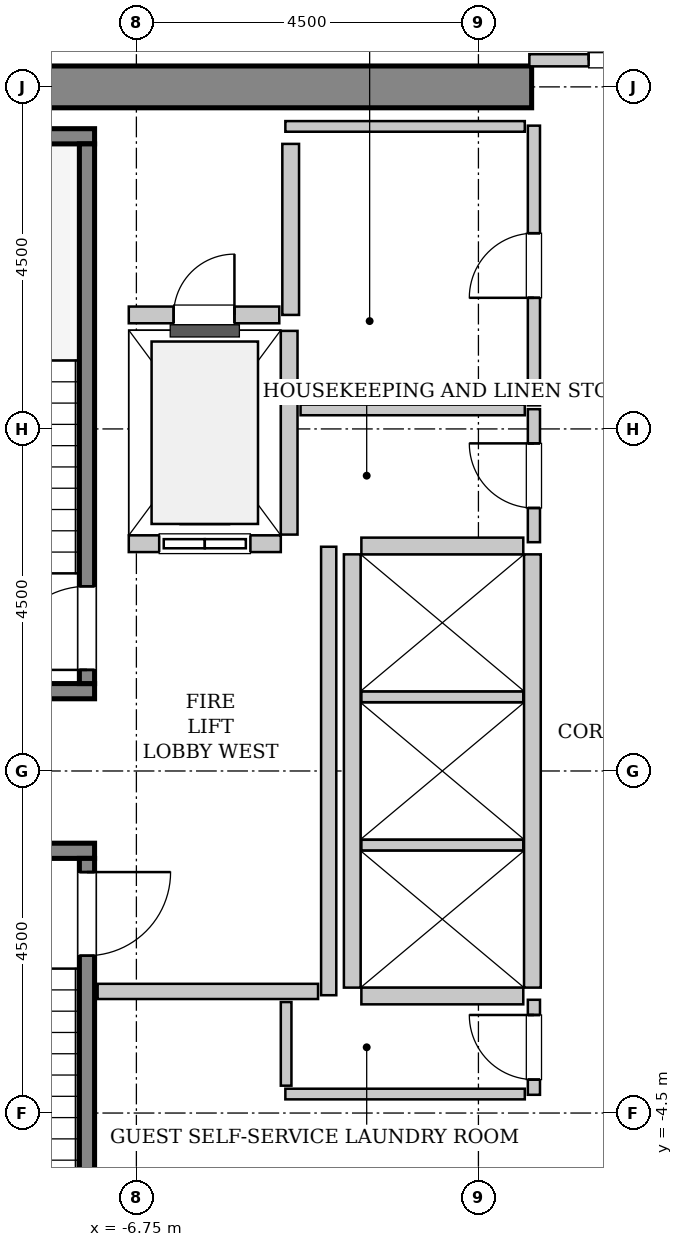
"""IFC4 building model, lengths in metres.
Left out: names, types, materials, properties, quantities, classifications, styles, units other than length and angle.
Written with IfcOpenShell. Run it as: python <this file> out.ifc"""

import sys

from ifc_helpers import new_model, si_unit, direction, frame, frame_2d, origin, place, context, subcontext, project, spatial, rectangle, extrude, source, transform, mapped, element, fill, save


model = new_model("IFC4")
c1 = context("Model", 3, precision=1e-05, world=origin(), true_north=direction((0.0, 1.0)))
c2 = subcontext(c1, "Body", "Model", "MODEL_VIEW")
j1 = project(units=[si_unit("LENGTHUNIT", "METRE"), si_unit("PLANEANGLEUNIT", "RADIAN")], contexts=[c1])
p1 = place(None, origin())
s1 = spatial("IfcSite", under=j1, at=p1, CompositionType="ELEMENT")
p2 = place(p1, origin())
s2 = spatial("IfcBuilding", under=s1, at=p2, CompositionType="ELEMENT")
p3 = place(p2, frame((0.0, 0.0, 152.6)))
s3 = spatial("IfcBuildingStorey", under=s2, at=p3, CompositionType="ELEMENT", Elevation=152.6)
m1 = source(origin(), c2, "Body", "SweptSolid", [
    extrude(rectangle(XDim=9.975, YDim=0.55, at=frame_2d((4.987, 0.0))), origin(), (0.0, 0.0, 1.0), 3.8),
])
p4 = place(p3, frame((-11.525, 9.0, 0.0), z_axis=(0.0, 0.0, 1.0), x_axis=(1.0, 0.0, 0.0)))
e1 = element("IfcWall", 1, at=p4, inside=s3, PredefinedType="SHEAR", context=c2, shape_type="MappedRepresentation", body=[
    mapped(m1, transform((0.0, 0.0, 0.0), x_axis=(1.0, 0.0, 0.0), y_axis=(0.0, 1.0, 0.0), z_axis=(0.0, 0.0, 1.0), scale=1.0)),
])
m2 = source(origin(), c2, "Body", "SweptSolid", [
    extrude(rectangle(XDim=3.4, YDim=0.2, at=frame_2d((1.7, 0.0))), origin(), (0.0, 0.0, 1.0), 3.8),
])
p5 = place(p3, frame((-7.3, 1.05, 0.0), z_axis=(0.0, 0.0, 1.0), x_axis=(-1.0, 0.0, 0.0)))
e2 = element("IfcWall", 2, at=p5, inside=s3, PredefinedType="SOLIDWALL", context=c2, shape_type="MappedRepresentation", body=[
    mapped(m2, transform((0.0, 0.0, 0.0), x_axis=(1.0, 0.0, 0.0), y_axis=(0.0, 1.0, 0.0), z_axis=(0.0, 0.0, 1.0), scale=1.0)),
])
m3 = source(origin(), c2, "Body", "SweptSolid", [
    extrude(rectangle(XDim=3.68, YDim=0.2, at=frame_2d((1.84, 0.0))), origin(), (0.0, 0.0, 1.0), 3.8),
])
p6 = place(p3, frame((-7.3, 8.35, 0.0), z_axis=(0.0, 0.0, 1.0), x_axis=(-1.0, 0.0, 0.0)))
e3 = element("IfcWall", 3, at=p6, inside=s3, PredefinedType="SOLIDWALL", context=c2, shape_type="MappedRepresentation", body=[
    mapped(m3, transform((0.0, 0.0, 0.0), x_axis=(1.0, 0.0, 0.0), y_axis=(0.0, 1.0, 0.0), z_axis=(0.0, 0.0, 1.0), scale=1.0)),
])
m4 = source(origin(), c2, "Body", "SweptSolid", [
    extrude(rectangle(XDim=7.1, YDim=0.2, at=frame_2d((3.55, 0.0))), origin(), (0.0, 0.0, 1.0), 3.8),
])
p7 = place(p3, frame((-7.4, 1.15, 0.0), z_axis=(0.0, 0.0, 1.0), x_axis=(0.0, 1.0, 0.0)))
e4 = element("IfcWall", 4, at=p7, inside=s3, PredefinedType="SOLIDWALL", context=c2, shape_type="MappedRepresentation", body=[
    mapped(m4, transform((0.0, 0.0, 0.0), x_axis=(1.0, 0.0, 0.0), y_axis=(0.0, 1.0, 0.0), z_axis=(0.0, 0.0, 1.0), scale=1.0)),
])
p8 = place(p7, frame((0.18, 0.0, 0.0)))
e5 = element("IfcOpeningElement", 5, at=p8, cuts=e4, PredefinedType="OPENING", context=c2, shape_type="SweptSolid", body=[
    extrude(rectangle(XDim=1.1, YDim=2.15, at=frame_2d((0.55, 1.075))), frame((0.0, 0.11, 0.0), z_axis=(0.0, -1.0, 0.0), x_axis=(1.0, 0.0, 0.0)), (0.0, 0.0, 1.0), 0.22),
])
p9 = place(p3, frame((-10.7, -1.05, 0.0), z_axis=(0.0, 0.0, 1.0), x_axis=(1.0, 0.0, 0.0)))
e6 = element("IfcWall", 6, at=p9, inside=s3, PredefinedType="SOLIDWALL", context=c2, shape_type="MappedRepresentation", body=[
    mapped(m2, transform((0.0, 0.0, 0.0), x_axis=(1.0, 0.0, 0.0), y_axis=(0.0, 1.0, 0.0), z_axis=(0.0, 0.0, 1.0), scale=1.0)),
])
p10 = place(p3, frame((-7.4, -1.15, 0.0), z_axis=(0.0, 0.0, 1.0), x_axis=(0.0, -1.0, 0.0)))
e7 = element("IfcWall", 7, at=p10, inside=s3, PredefinedType="SOLIDWALL", context=c2, shape_type="MappedRepresentation", body=[
    mapped(m4, transform((0.0, 0.0, 0.0), x_axis=(1.0, 0.0, 0.0), y_axis=(0.0, 1.0, 0.0), z_axis=(0.0, 0.0, 1.0), scale=1.0)),
])
p11 = place(p10, frame((0.18, 0.0, 0.0)))
e8 = element("IfcOpeningElement", 8, at=p11, cuts=e7, PredefinedType="OPENING", context=c2, shape_type="SweptSolid", body=[
    extrude(rectangle(XDim=1.1, YDim=2.15, at=frame_2d((0.55, 1.075))), frame((0.0, 0.11, 0.0), z_axis=(0.0, -1.0, 0.0), x_axis=(1.0, 0.0, 0.0)), (0.0, 0.0, 1.0), 0.22),
])
m5 = source(origin(), c2, "Body", "SweptSolid", [
    extrude(rectangle(XDim=2.0, YDim=0.22, at=frame_2d((1.0, 0.0))), origin(), (0.0, 0.0, 1.0), 3.535),
])
p12 = place(p3, frame((-6.85, 2.99, 0.0), z_axis=(0.0, 0.0, 1.0), x_axis=(1.0, 0.0, 0.0)))
e9 = element("IfcWall", 9, at=p12, inside=s3, PredefinedType="SOLIDWALL", context=c2, shape_type="MappedRepresentation", body=[
    mapped(m5, transform((0.0, 0.0, 0.0), x_axis=(1.0, 0.0, 0.0), y_axis=(0.0, 1.0, 0.0), z_axis=(0.0, 0.0, 1.0), scale=1.0)),
])
p13 = place(p12, frame((0.4, 0.0, 0.0)))
e10 = element("IfcOpeningElement", 10, at=p13, cuts=e9, PredefinedType="OPENING", context=c2, shape_type="SweptSolid", body=[
    extrude(rectangle(XDim=1.2, YDim=2.2, at=frame_2d((0.6, 1.1))), frame((0.0, 0.12, 0.0), z_axis=(0.0, -1.0, 0.0), x_axis=(1.0, 0.0, 0.0)), (0.0, 0.0, 1.0), 0.24),
])
m6 = source(origin(), c2, "Body", "SweptSolid", [
    extrude(rectangle(XDim=2.68, YDim=0.22, at=frame_2d((1.34, 0.0))), origin(), (0.0, 0.0, 1.0), 3.535),
])
p14 = place(p3, frame((-4.74, 3.11, 0.0), z_axis=(0.0, 0.0, 1.0), x_axis=(0.0, 1.0, 0.0)))
e11 = element("IfcWall", 11, at=p14, inside=s3, PredefinedType="SOLIDWALL", context=c2, shape_type="MappedRepresentation", body=[
    mapped(m6, transform((0.0, 0.0, 0.0), x_axis=(1.0, 0.0, 0.0), y_axis=(0.0, 1.0, 0.0), z_axis=(0.0, 0.0, 1.0), scale=1.0)),
])
m7 = source(origin(), c2, "Body", "SweptSolid", [
    extrude(rectangle(XDim=5.7, YDim=0.22, at=frame_2d((2.85, 0.0))), origin(), (0.0, 0.0, 1.0), 3.535),
])
for number, where, z_axis, x_axis in (
    (12, (-1.54, -2.85, 0.0), (0.0, 0.0, 1.0), (0.0, 1.0, 0.0)),
    (13, (-3.91, 2.85, 0.0), (0.0, 0.0, 1.0), (0.0, -1.0, 0.0)),
):
    element("IfcWall", number, at=place(p3, frame(where, z_axis=z_axis, x_axis=x_axis)), inside=s3, PredefinedType="SOLIDWALL", context=c2, shape_type="MappedRepresentation", body=[
        mapped(m7, transform((0.0, 0.0, 0.0), x_axis=(1.0, 0.0, 0.0), y_axis=(0.0, 1.0, 0.0), z_axis=(0.0, 0.0, 1.0), scale=1.0)),
    ])
m8 = source(origin(), c2, "Body", "SweptSolid", [
    extrude(rectangle(XDim=2.13, YDim=0.22, at=frame_2d((1.065, 0.0))), origin(), (0.0, 0.0, 1.0), 3.535),
])
p15 = place(p3, frame((-3.79, -2.96, 0.0), z_axis=(0.0, 0.0, 1.0), x_axis=(1.0, 0.0, 0.0)))
e14 = element("IfcWall", 14, at=p15, inside=s3, PredefinedType="SOLIDWALL", context=c2, shape_type="MappedRepresentation", body=[
    mapped(m8, transform((0.0, 0.0, 0.0), x_axis=(1.0, 0.0, 0.0), y_axis=(0.0, 1.0, 0.0), z_axis=(0.0, 0.0, 1.0), scale=1.0)),
])
m9 = source(origin(), c2, "Body", "SweptSolid", [
    extrude(rectangle(XDim=2.13, YDim=0.14, at=frame_2d((1.065, 0.0))), origin(), (0.0, 0.0, 1.0), 3.535),
])
for number, where, z_axis, x_axis in (
    (15, (-3.79, -0.975, 0.0), (0.0, 0.0, 1.0), (1.0, 0.0, 0.0)),
    (16, (-3.79, 0.975, 0.0), (0.0, 0.0, 1.0), (1.0, 0.0, 0.0)),
):
    element("IfcWall", number, at=place(p3, frame(where, z_axis=z_axis, x_axis=x_axis)), inside=s3, PredefinedType="PARTITIONING", context=c2, shape_type="MappedRepresentation", body=[
        mapped(m9, transform((0.0, 0.0, 0.0), x_axis=(1.0, 0.0, 0.0), y_axis=(0.0, 1.0, 0.0), z_axis=(0.0, 0.0, 1.0), scale=1.0)),
    ])
p16 = place(p3, frame((-1.66, 2.96, 0.0), z_axis=(0.0, 0.0, 1.0), x_axis=(-1.0, 0.0, 0.0)))
e17 = element("IfcWall", 17, at=p16, inside=s3, PredefinedType="SOLIDWALL", context=c2, shape_type="MappedRepresentation", body=[
    mapped(m8, transform((0.0, 0.0, 0.0), x_axis=(1.0, 0.0, 0.0), y_axis=(0.0, 1.0, 0.0), z_axis=(0.0, 0.0, 1.0), scale=1.0)),
])
m10 = source(origin(), c2, "Body", "SweptSolid", [
    extrude(rectangle(XDim=2.25, YDim=0.22, at=frame_2d((1.125, 0.0))), origin(), (0.0, 0.0, 1.0), 3.535),
])
p17 = place(p3, frame((-4.72, 6.0, 0.0), z_axis=(0.0, 0.0, 1.0), x_axis=(0.0, 1.0, 0.0)))
e18 = element("IfcWall", 18, at=p17, inside=s3, PredefinedType="SOLIDWALL", context=c2, shape_type="MappedRepresentation", body=[
    mapped(m10, transform((0.0, 0.0, 0.0), x_axis=(1.0, 0.0, 0.0), y_axis=(0.0, 1.0, 0.0), z_axis=(0.0, 0.0, 1.0), scale=1.0)),
])
m11 = source(origin(), c2, "Body", "SweptSolid", [
    extrude(rectangle(XDim=1.98, YDim=0.22, at=frame_2d((0.99, 0.0))), origin(), (0.0, 0.0, 1.0), 3.535),
])
p18 = place(p3, frame((-6.85, 6.0, 0.0), z_axis=(0.0, 0.0, 1.0), x_axis=(1.0, 0.0, 0.0)))
e19 = element("IfcWall", 19, at=p18, inside=s3, PredefinedType="SOLIDWALL", context=c2, shape_type="MappedRepresentation", body=[
    mapped(m11, transform((0.0, 0.0, 0.0), x_axis=(1.0, 0.0, 0.0), y_axis=(0.0, 1.0, 0.0), z_axis=(0.0, 0.0, 1.0), scale=1.0)),
])
p19 = place(p18, frame((0.59, 0.0, 0.0)))
e20 = element("IfcOpeningElement", 20, at=p19, cuts=e19, PredefinedType="OPENING", context=c2, shape_type="SweptSolid", body=[
    extrude(rectangle(XDim=0.8, YDim=2.0, at=frame_2d((0.4, 1.0))), frame((0.0, 0.12, 0.0), z_axis=(0.0, -1.0, 0.0), x_axis=(1.0, 0.0, 0.0)), (0.0, 0.0, 1.0), 0.24),
])
m12 = source(origin(), c2, "Body", "SweptSolid", [
    extrude(rectangle(XDim=5.9, YDim=0.2, at=frame_2d((2.95, 0.0))), origin(), (0.0, 0.0, 1.0), 3.535),
])
p20 = place(p3, frame((-4.22, -2.95, 0.0), z_axis=(0.0, 0.0, 1.0), x_axis=(0.0, 1.0, 0.0)))
e21 = element("IfcWall", 21, at=p20, inside=s3, PredefinedType="PARTITIONING", context=c2, shape_type="MappedRepresentation", body=[
    mapped(m12, transform((0.0, 0.0, 0.0), x_axis=(1.0, 0.0, 0.0), y_axis=(0.0, 1.0, 0.0), z_axis=(0.0, 0.0, 1.0), scale=1.0)),
])
m13 = source(origin(), c2, "Body", "SweptSolid", [
    extrude(rectangle(XDim=2.9, YDim=0.2, at=frame_2d((1.45, 0.0))), origin(), (0.0, 0.0, 1.0), 3.535),
])
p21 = place(p3, frame((-7.26, -2.9, 0.0), z_axis=(0.0, 0.0, 1.0), x_axis=(1.0, 0.0, 0.0)))
e22 = element("IfcWall", 22, at=p21, inside=s3, PredefinedType="PARTITIONING", context=c2, shape_type="MappedRepresentation", body=[
    mapped(m13, transform((0.0, 0.0, 0.0), x_axis=(1.0, 0.0, 0.0), y_axis=(0.0, 1.0, 0.0), z_axis=(0.0, 0.0, 1.0), scale=1.0)),
])
m14 = source(origin(), c2, "Body", "SweptSolid", [
    extrude(rectangle(XDim=3.16, YDim=0.16, at=frame_2d((1.58, 0.0))), origin(), (0.0, 0.0, 1.0), 2.425),
])
p22 = place(p3, frame((-1.58, 9.35, 0.0), z_axis=(0.0, 0.0, 1.0), x_axis=(1.0, 0.0, 0.0)))
e23 = element("IfcWall", 23, at=p22, inside=s3, PredefinedType="PARTITIONING", context=c2, shape_type="MappedRepresentation", body=[
    mapped(m14, transform((0.0, 0.0, 0.0), x_axis=(1.0, 0.0, 0.0), y_axis=(0.0, 1.0, 0.0), z_axis=(0.0, 0.0, 1.0), scale=1.0)),
])
p23 = place(p22, frame((0.78, 0.0, 0.0)))
e24 = element("IfcOpeningElement", 24, at=p23, cuts=e23, PredefinedType="OPENING", context=c2, shape_type="SweptSolid", body=[
    extrude(rectangle(XDim=1.6, YDim=2.3, at=frame_2d((0.8, 1.15))), frame((0.0, 0.09, 0.0), z_axis=(0.0, -1.0, 0.0), x_axis=(1.0, 0.0, 0.0)), (0.0, 0.0, 1.0), 0.18),
])
m15 = source(origin(), c2, "Body", "SweptSolid", [
    extrude(rectangle(XDim=1.75, YDim=0.16, at=frame_2d((0.875, 0.0))), origin(), (0.0, 0.0, 1.0), 3.535),
])
p24 = place(p3, frame((-1.52, 3.01, 0.0), z_axis=(0.0, 0.0, 1.0), x_axis=(0.0, 1.0, 0.0)))
e25 = element("IfcWall", 25, at=p24, inside=s3, PredefinedType="PARTITIONING", context=c2, shape_type="MappedRepresentation", body=[
    mapped(m15, transform((0.0, 0.0, 0.0), x_axis=(1.0, 0.0, 0.0), y_axis=(0.0, 1.0, 0.0), z_axis=(0.0, 0.0, 1.0), scale=1.0)),
])
p25 = place(p24, frame((0.45, 0.0, 0.0)))
e26 = element("IfcOpeningElement", 26, at=p25, cuts=e25, PredefinedType="OPENING", context=c2, shape_type="SweptSolid", body=[
    extrude(rectangle(XDim=0.85, YDim=2.1, at=frame_2d((0.425, 1.05))), frame((0.0, 0.09, 0.0), z_axis=(0.0, -1.0, 0.0), x_axis=(1.0, 0.0, 0.0)), (0.0, 0.0, 1.0), 0.18),
])
m16 = source(origin(), c2, "Body", "SweptSolid", [
    extrude(rectangle(XDim=2.95, YDim=0.14, at=frame_2d((1.475, 0.0))), origin(), (0.0, 0.0, 1.0), 3.535),
])
p26 = place(p3, frame((-4.59, 4.75, 0.0), z_axis=(0.0, 0.0, 1.0), x_axis=(1.0, 0.0, 0.0)))
e27 = element("IfcWall", 27, at=p26, inside=s3, PredefinedType="PARTITIONING", context=c2, shape_type="MappedRepresentation", body=[
    mapped(m16, transform((0.0, 0.0, 0.0), x_axis=(1.0, 0.0, 0.0), y_axis=(0.0, 1.0, 0.0), z_axis=(0.0, 0.0, 1.0), scale=1.0)),
])
m17 = source(origin(), c2, "Body", "SweptSolid", [
    extrude(rectangle(XDim=3.68, YDim=0.16, at=frame_2d((1.84, 0.0))), origin(), (0.0, 0.0, 1.0), 3.535),
])
p27 = place(p3, frame((-1.52, 4.81, 0.0), z_axis=(0.0, 0.0, 1.0), x_axis=(0.0, 1.0, 0.0)))
e28 = element("IfcWall", 28, at=p27, inside=s3, PredefinedType="PARTITIONING", context=c2, shape_type="MappedRepresentation", body=[
    mapped(m17, transform((0.0, 0.0, 0.0), x_axis=(1.0, 0.0, 0.0), y_axis=(0.0, 1.0, 0.0), z_axis=(0.0, 0.0, 1.0), scale=1.0)),
])
p28 = place(p27, frame((1.415, 0.0, 0.0)))
e29 = element("IfcOpeningElement", 29, at=p28, cuts=e28, PredefinedType="OPENING", context=c2, shape_type="SweptSolid", body=[
    extrude(rectangle(XDim=0.85, YDim=2.1, at=frame_2d((0.425, 1.05))), frame((0.0, 0.09, 0.0), z_axis=(0.0, -1.0, 0.0), x_axis=(1.0, 0.0, 0.0)), (0.0, 0.0, 1.0), 0.18),
])
m18 = source(origin(), c2, "Body", "SweptSolid", [
    extrude(rectangle(XDim=3.15, YDim=0.14, at=frame_2d((1.575, 0.0))), origin(), (0.0, 0.0, 1.0), 3.535),
])
p29 = place(p3, frame((-4.79, 8.48, 0.0), z_axis=(0.0, 0.0, 1.0), x_axis=(1.0, 0.0, 0.0)))
e30 = element("IfcWall", 30, at=p29, inside=s3, PredefinedType="PARTITIONING", context=c2, shape_type="MappedRepresentation", body=[
    mapped(m18, transform((0.0, 0.0, 0.0), x_axis=(1.0, 0.0, 0.0), y_axis=(0.0, 1.0, 0.0), z_axis=(0.0, 0.0, 1.0), scale=1.0)),
])
m19 = source(origin(), c2, "Body", "SweptSolid", [
    extrude(rectangle(XDim=1.25, YDim=0.16, at=frame_2d((0.625, 0.0))), origin(), (0.0, 0.0, 1.0), 3.535),
])
p30 = place(p3, frame((-1.52, -4.26, 0.0), z_axis=(0.0, 0.0, 1.0), x_axis=(0.0, 1.0, 0.0)))
e31 = element("IfcWall", 31, at=p30, inside=s3, PredefinedType="PARTITIONING", context=c2, shape_type="MappedRepresentation", body=[
    mapped(m19, transform((0.0, 0.0, 0.0), x_axis=(1.0, 0.0, 0.0), y_axis=(0.0, 1.0, 0.0), z_axis=(0.0, 0.0, 1.0), scale=1.0)),
])
p31 = place(p30, frame((0.2, 0.0, 0.0)))
e32 = element("IfcOpeningElement", 32, at=p31, cuts=e31, PredefinedType="OPENING", context=c2, shape_type="SweptSolid", body=[
    extrude(rectangle(XDim=0.85, YDim=2.1, at=frame_2d((0.425, 1.05))), frame((0.0, 0.09, 0.0), z_axis=(0.0, -1.0, 0.0), x_axis=(1.0, 0.0, 0.0)), (0.0, 0.0, 1.0), 0.18),
])
p32 = place(p3, frame((-4.79, -4.25, 0.0), z_axis=(0.0, 0.0, 1.0), x_axis=(1.0, 0.0, 0.0)))
e33 = element("IfcWall", 33, at=p32, inside=s3, PredefinedType="PARTITIONING", context=c2, shape_type="MappedRepresentation", body=[
    mapped(m18, transform((0.0, 0.0, 0.0), x_axis=(1.0, 0.0, 0.0), y_axis=(0.0, 1.0, 0.0), z_axis=(0.0, 0.0, 1.0), scale=1.0)),
])
m20 = source(origin(), c2, "Body", "SweptSolid", [
    extrude(rectangle(XDim=1.1, YDim=0.14, at=frame_2d((0.55, 0.0))), origin(), (0.0, 0.0, 1.0), 3.535),
])
p33 = place(p3, frame((-4.78, -4.14, 0.0), z_axis=(0.0, 0.0, 1.0), x_axis=(0.0, 1.0, 0.0)))
e34 = element("IfcWall", 34, at=p33, inside=s3, PredefinedType="PARTITIONING", context=c2, shape_type="MappedRepresentation", body=[
    mapped(m20, transform((0.0, 0.0, 0.0), x_axis=(1.0, 0.0, 0.0), y_axis=(0.0, 1.0, 0.0), z_axis=(0.0, 0.0, 1.0), scale=1.0)),
])
m21 = source(origin(), c2, "Body", "SweptSolid", [
    extrude(rectangle(XDim=1.1, YDim=2.15, at=frame_2d((0.55, 1.075))), frame((0.0, 0.025, 0.0), z_axis=(0.0, -1.0, 0.0), x_axis=(1.0, 0.0, 0.0)), (0.0, 0.0, 1.0), 0.05),
])
p34 = place(p8, origin())
e35 = element("IfcDoor", 35, at=p34, inside=s3, OperationType="SINGLE_SWING_LEFT", PredefinedType="DOOR", context=c2, shape_type="MappedRepresentation", body=[
    mapped(m21, transform((0.0, 0.0, 0.0), x_axis=(1.0, 0.0, 0.0), y_axis=(0.0, 1.0, 0.0), z_axis=(0.0, 0.0, 1.0), scale=1.0)),
])
fill(e5, e35)
p35 = place(p11, origin())
e36 = element("IfcDoor", 36, at=p35, inside=s3, OperationType="SINGLE_SWING_LEFT", PredefinedType="DOOR", context=c2, shape_type="MappedRepresentation", body=[
    mapped(m21, transform((0.0, 0.0, 0.0), x_axis=(1.0, 0.0, 0.0), y_axis=(0.0, 1.0, 0.0), z_axis=(0.0, 0.0, 1.0), scale=1.0)),
])
fill(e8, e36)
m22 = source(origin(), c2, "Body", "SweptSolid", [
    extrude(rectangle(XDim=1.2, YDim=2.2, at=frame_2d((0.6, 1.1))), frame((0.0, 0.025, 0.0), z_axis=(0.0, -1.0, 0.0), x_axis=(1.0, 0.0, 0.0)), (0.0, 0.0, 1.0), 0.05),
])
p36 = place(p13, origin())
e37 = element("IfcDoor", 37, at=p36, inside=s3, OperationType="SLIDING_TO_LEFT", PredefinedType="DOOR", context=c2, shape_type="MappedRepresentation", body=[
    mapped(m22, transform((0.0, 0.0, 0.0), x_axis=(1.0, 0.0, 0.0), y_axis=(0.0, 1.0, 0.0), z_axis=(0.0, 0.0, 1.0), scale=1.0)),
])
fill(e10, e37)
m23 = source(origin(), c2, "Body", "SweptSolid", [
    extrude(rectangle(XDim=0.8, YDim=2.0, at=frame_2d((0.4, 1.0))), frame((0.0, 0.025, 0.0), z_axis=(0.0, -1.0, 0.0), x_axis=(1.0, 0.0, 0.0)), (0.0, 0.0, 1.0), 0.05),
])
p37 = place(p19, origin())
e38 = element("IfcDoor", 38, at=p37, inside=s3, OperationType="SINGLE_SWING_RIGHT", PredefinedType="TRAPDOOR", context=c2, shape_type="MappedRepresentation", body=[
    mapped(m23, transform((0.0, 0.0, 0.0), x_axis=(1.0, 0.0, 0.0), y_axis=(0.0, 1.0, 0.0), z_axis=(0.0, 0.0, 1.0), scale=1.0)),
])
fill(e20, e38)
m24 = source(origin(), c2, "Body", "SweptSolid", [
    extrude(rectangle(XDim=1.6, YDim=2.3, at=frame_2d((0.8, 1.15))), frame((0.0, 0.025, 0.0), z_axis=(0.0, -1.0, 0.0), x_axis=(1.0, 0.0, 0.0)), (0.0, 0.0, 1.0), 0.05),
])
p38 = place(p23, origin())
e39 = element("IfcDoor", 39, at=p38, inside=s3, OperationType="DOUBLE_DOOR_SINGLE_SWING", PredefinedType="DOOR", context=c2, shape_type="MappedRepresentation", body=[
    mapped(m24, transform((0.0, 0.0, 0.0), x_axis=(1.0, 0.0, 0.0), y_axis=(0.0, 1.0, 0.0), z_axis=(0.0, 0.0, 1.0), scale=1.0)),
])
fill(e24, e39)
m25 = source(origin(), c2, "Body", "SweptSolid", [
    extrude(rectangle(XDim=0.85, YDim=2.1, at=frame_2d((0.425, 1.05))), frame((0.0, 0.025, 0.0), z_axis=(0.0, -1.0, 0.0), x_axis=(1.0, 0.0, 0.0)), (0.0, 0.0, 1.0), 0.05),
])
p39 = place(p25, origin())
e40 = element("IfcDoor", 40, at=p39, inside=s3, OperationType="SINGLE_SWING_RIGHT", PredefinedType="DOOR", context=c2, shape_type="MappedRepresentation", body=[
    mapped(m25, transform((0.0, 0.0, 0.0), x_axis=(1.0, 0.0, 0.0), y_axis=(0.0, 1.0, 0.0), z_axis=(0.0, 0.0, 1.0), scale=1.0)),
])
fill(e26, e40)
p40 = place(p28, origin())
e41 = element("IfcDoor", 41, at=p40, inside=s3, OperationType="SINGLE_SWING_LEFT", PredefinedType="DOOR", context=c2, shape_type="MappedRepresentation", body=[
    mapped(m25, transform((0.0, 0.0, 0.0), x_axis=(1.0, 0.0, 0.0), y_axis=(0.0, 1.0, 0.0), z_axis=(0.0, 0.0, 1.0), scale=1.0)),
])
fill(e29, e41)
p41 = place(p31, origin())
e42 = element("IfcDoor", 42, at=p41, inside=s3, OperationType="SINGLE_SWING_RIGHT", PredefinedType="DOOR", context=c2, shape_type="MappedRepresentation", body=[
    mapped(m25, transform((0.0, 0.0, 0.0), x_axis=(1.0, 0.0, 0.0), y_axis=(0.0, 1.0, 0.0), z_axis=(0.0, 0.0, 1.0), scale=1.0)),
])
fill(e32, e42)
save(model, sys.argv[1])
